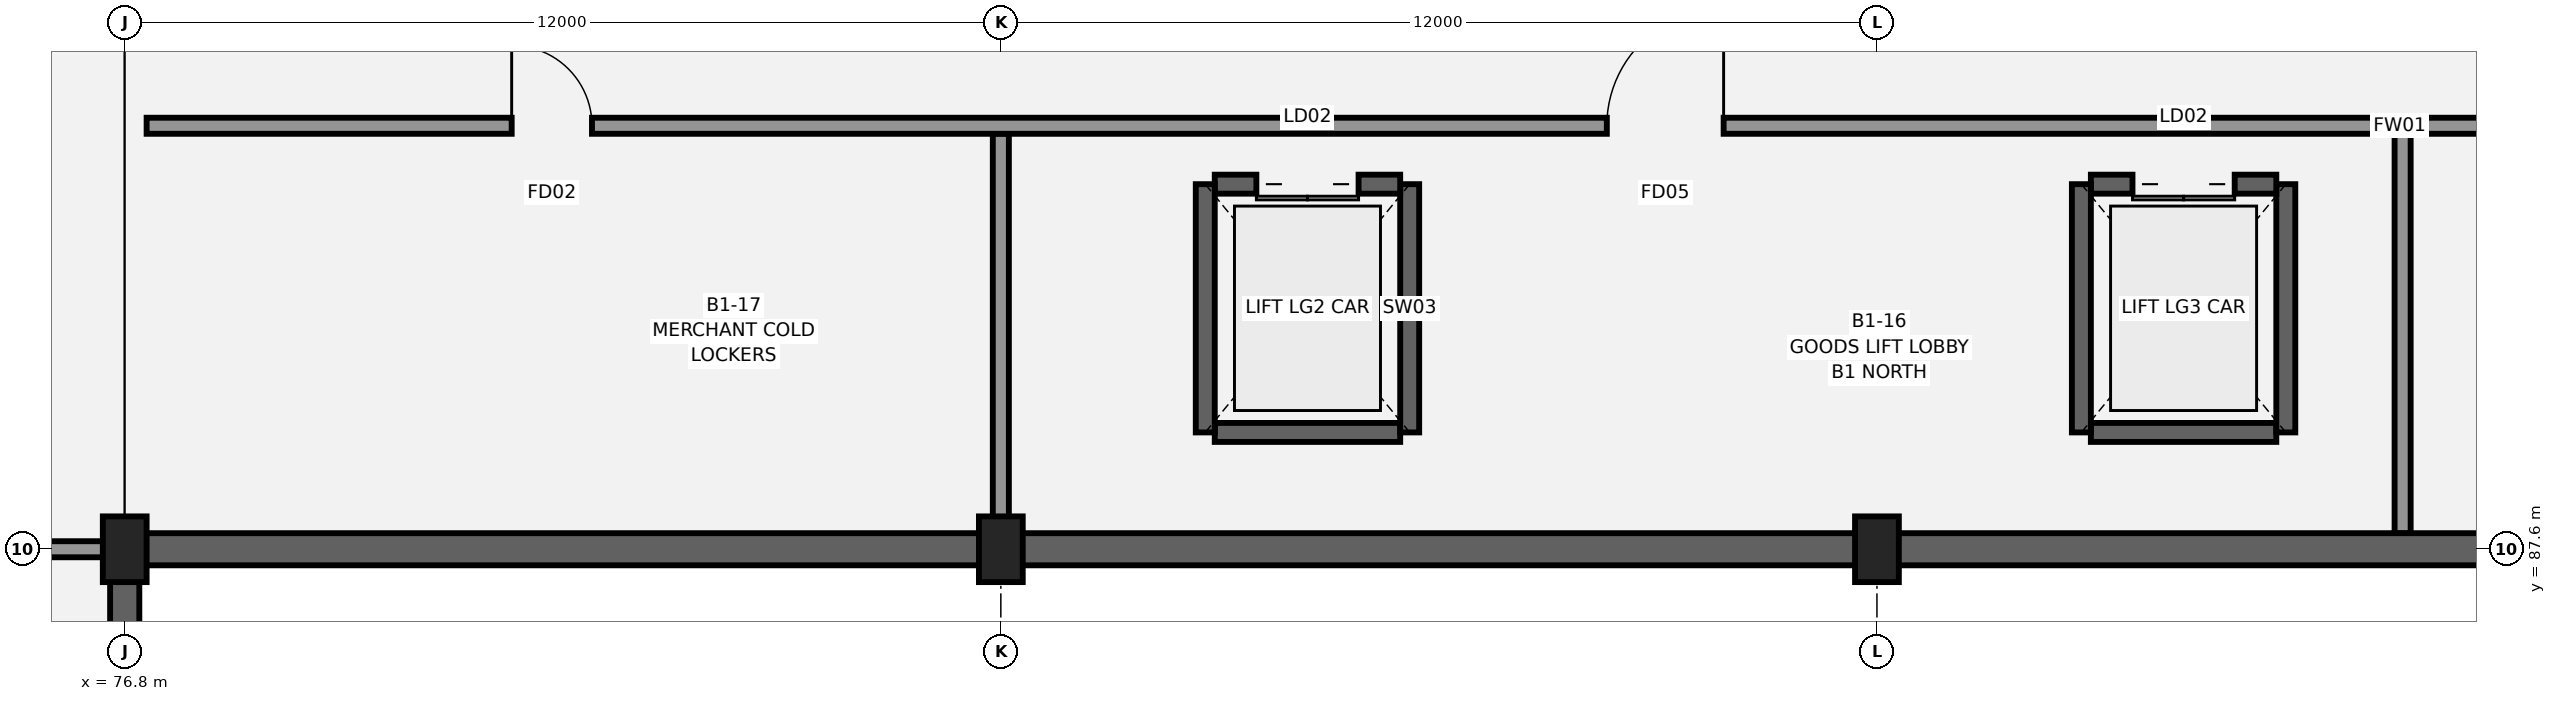
"""IFC4 building model, lengths in metres.
Left out: names, types, materials, properties, quantities, classifications, styles, units other than length and angle.
Written with IfcOpenShell. Run it as: python <this file> out.ifc"""

import sys

from ifc_helpers import new_model, si_unit, direction, frame, frame_2d, origin, origin_2d, place, context, subcontext, project, spatial, rectangle, extrude, element, fill, save


model = new_model("IFC4")
c1 = context("Model", 3, precision=1e-05, world=origin(), true_north=direction((0.0, 1.0)))
c2 = subcontext(c1, "Body", "Model", "MODEL_VIEW")
j1 = project(units=[si_unit("LENGTHUNIT", "METRE"), si_unit("PLANEANGLEUNIT", "RADIAN")], contexts=[c1])
p1 = place(None, origin())
s1 = spatial("IfcSite", under=j1, at=p1, CompositionType="ELEMENT")
p2 = place(p1, origin())
s2 = spatial("IfcBuilding", under=s1, at=p2, CompositionType="ELEMENT")
p3 = place(p2, frame((0.0, 0.0, -4.8)))
s3 = spatial("IfcBuildingStorey", under=s2, at=p3, CompositionType="ELEMENT", Elevation=-4.8)
p4 = place(p3, frame((76.8, 51.6, 0.0), z_axis=(0.0, 0.0, 1.0), x_axis=(0.0, 1.0, 0.0)))
e1 = element("IfcWall", 1, at=p4, inside=s3, PredefinedType="USERDEFINED", context=c2, shape_type="SweptSolid", body=[
    extrude(rectangle(XDim=36.0, YDim=0.4, at=frame_2d((18.0, 0.0))), origin(), (0.0, 0.0, 1.0), 4.46),
])
p5 = place(p3, frame((76.8, 87.6, 0.0), z_axis=(0.0, 0.0, 1.0), x_axis=(1.0, 0.0, 0.0)))
e2 = element("IfcWall", 2, at=p5, inside=s3, PredefinedType="USERDEFINED", context=c2, shape_type="SweptSolid", body=[
    extrude(rectangle(XDim=72.0, YDim=0.44, at=frame_2d((36.0, 0.0))), origin(), (0.0, 0.0, 1.0), 4.46),
])
for number, where, z_axis, x_axis in (
    (3, (76.8, 87.6, 0.0), (0.0, 0.0, 1.0), (1.0, 0.0, 0.0)),
    (4, (88.8, 87.6, 0.0), (0.0, 0.0, 1.0), (1.0, 0.0, 0.0)),
    (5, (100.8, 87.6, 0.0), (0.0, 0.0, 1.0), (1.0, 0.0, 0.0)),
):
    element("IfcColumn", number, at=place(p3, frame(where, z_axis=z_axis, x_axis=x_axis)), inside=s3, PredefinedType="COLUMN", context=c2, shape_type="SweptSolid", body=[
        extrude(rectangle(XDim=0.6, YDim=0.9, at=origin_2d()), origin(), (0.0, 0.0, 1.0), 4.8),
    ])
p6 = place(p3, frame((91.73, 89.2, 0.0), z_axis=(0.0, 0.0, 1.0), x_axis=(1.0, 0.0, 0.0)))
e6 = element("IfcWall", 6, at=p6, inside=s3, PredefinedType="SHEAR", context=c2, shape_type="SweptSolid", body=[
    extrude(rectangle(XDim=2.54, YDim=0.26, at=frame_2d((1.27, 0.0))), origin(), (0.0, 0.0, 1.0), 4.46),
])
p7 = place(p3, frame((94.4, 89.2, 0.0), z_axis=(0.0, 0.0, 1.0), x_axis=(0.0, 1.0, 0.0)))
e7 = element("IfcWall", 7, at=p7, inside=s3, PredefinedType="SHEAR", context=c2, shape_type="SweptSolid", body=[
    extrude(rectangle(XDim=3.4, YDim=0.26, at=frame_2d((1.7, 0.0))), origin(), (0.0, 0.0, 1.0), 4.46),
])
p8 = place(p3, frame((94.27, 92.6, 0.0), z_axis=(0.0, 0.0, 1.0), x_axis=(-1.0, 0.0, 0.0)))
e8 = element("IfcWall", 8, at=p8, inside=s3, PredefinedType="SHEAR", context=c2, shape_type="SweptSolid", body=[
    extrude(rectangle(XDim=2.54, YDim=0.26, at=frame_2d((1.27, 0.0))), origin(), (0.0, 0.0, 1.0), 4.46),
])
p9 = place(p8, frame((0.57, 0.0, 0.0)))
e9 = element("IfcOpeningElement", 9, at=p9, cuts=e8, PredefinedType="OPENING", context=c2, shape_type="SweptSolid", body=[
    extrude(rectangle(XDim=1.4, YDim=2.25, at=frame_2d((0.7, 1.125))), frame((0.0, 0.14, 0.0), z_axis=(0.0, -1.0, 0.0), x_axis=(1.0, 0.0, 0.0)), (0.0, 0.0, 1.0), 0.28),
])
p10 = place(p3, frame((91.6, 92.6, 0.0), z_axis=(0.0, 0.0, 1.0), x_axis=(0.0, -1.0, 0.0)))
e10 = element("IfcWall", 10, at=p10, inside=s3, PredefinedType="SHEAR", context=c2, shape_type="SweptSolid", body=[
    extrude(rectangle(XDim=3.4, YDim=0.26, at=frame_2d((1.7, 0.0))), origin(), (0.0, 0.0, 1.0), 4.46),
])
p11 = place(p3, frame((103.73, 89.2, 0.0), z_axis=(0.0, 0.0, 1.0), x_axis=(1.0, 0.0, 0.0)))
e11 = element("IfcWall", 11, at=p11, inside=s3, PredefinedType="SHEAR", context=c2, shape_type="SweptSolid", body=[
    extrude(rectangle(XDim=2.54, YDim=0.26, at=frame_2d((1.27, 0.0))), origin(), (0.0, 0.0, 1.0), 4.46),
])
p12 = place(p3, frame((106.4, 89.2, 0.0), z_axis=(0.0, 0.0, 1.0), x_axis=(0.0, 1.0, 0.0)))
e12 = element("IfcWall", 12, at=p12, inside=s3, PredefinedType="SHEAR", context=c2, shape_type="SweptSolid", body=[
    extrude(rectangle(XDim=3.4, YDim=0.26, at=frame_2d((1.7, 0.0))), origin(), (0.0, 0.0, 1.0), 4.46),
])
p13 = place(p3, frame((106.27, 92.6, 0.0), z_axis=(0.0, 0.0, 1.0), x_axis=(-1.0, 0.0, 0.0)))
e13 = element("IfcWall", 13, at=p13, inside=s3, PredefinedType="SHEAR", context=c2, shape_type="SweptSolid", body=[
    extrude(rectangle(XDim=2.54, YDim=0.26, at=frame_2d((1.27, 0.0))), origin(), (0.0, 0.0, 1.0), 4.46),
])
p14 = place(p13, frame((0.57, 0.0, 0.0)))
e14 = element("IfcOpeningElement", 14, at=p14, cuts=e13, PredefinedType="OPENING", context=c2, shape_type="SweptSolid", body=[
    extrude(rectangle(XDim=1.4, YDim=2.25, at=frame_2d((0.7, 1.125))), frame((0.0, 0.14, 0.0), z_axis=(0.0, -1.0, 0.0), x_axis=(1.0, 0.0, 0.0)), (0.0, 0.0, 1.0), 0.28),
])
p15 = place(p3, frame((103.6, 92.6, 0.0), z_axis=(0.0, 0.0, 1.0), x_axis=(0.0, -1.0, 0.0)))
e15 = element("IfcWall", 15, at=p15, inside=s3, PredefinedType="SHEAR", context=c2, shape_type="SweptSolid", body=[
    extrude(rectangle(XDim=3.4, YDim=0.26, at=frame_2d((1.7, 0.0))), origin(), (0.0, 0.0, 1.0), 4.46),
])
p16 = place(p3, frame((19.402, 87.6, 0.0), z_axis=(0.0, 0.0, 1.0), x_axis=(1.0, 0.0, 0.0)))
e16 = element("IfcWall", 16, at=p16, inside=s3, PredefinedType="PARTITIONING", context=c2, shape_type="SweptSolid", body=[
    extrude(rectangle(XDim=57.196, YDim=0.22, at=frame_2d((28.598, 0.0))), origin(), (0.0, 0.0, 1.0), 3.905),
])
p17 = place(p16, frame((6.2, 0.0, 0.0)))
e17 = element("IfcOpeningElement", 17, at=p17, cuts=e16, PredefinedType="OPENING", context=c2, shape_type="SweptSolid", body=[
    extrude(rectangle(XDim=1.5, YDim=2.4, at=frame_2d((0.75, 1.2))), frame((0.0, 0.12, 0.0), z_axis=(0.0, -1.0, 0.0), x_axis=(1.0, 0.0, 0.0)), (0.0, 0.0, 1.0), 0.24),
])
p18 = place(p16, frame((25.2, 0.0, 0.0)))
e18 = element("IfcOpeningElement", 18, at=p18, cuts=e16, PredefinedType="OPENING", context=c2, shape_type="SweptSolid", body=[
    extrude(rectangle(XDim=1.5, YDim=2.4, at=frame_2d((0.75, 1.2))), frame((0.0, 0.12, 0.0), z_axis=(0.0, -1.0, 0.0), x_axis=(1.0, 0.0, 0.0)), (0.0, 0.0, 1.0), 0.24),
])
p19 = place(p16, frame((44.2, 0.0, 0.0)))
e19 = element("IfcOpeningElement", 19, at=p19, cuts=e16, PredefinedType="OPENING", context=c2, shape_type="SweptSolid", body=[
    extrude(rectangle(XDim=1.2, YDim=2.2, at=frame_2d((0.6, 1.1))), frame((0.0, 0.12, 0.0), z_axis=(0.0, -1.0, 0.0), x_axis=(1.0, 0.0, 0.0)), (0.0, 0.0, 1.0), 0.24),
])
p20 = place(p3, frame((77.1, 93.4, 0.0), z_axis=(0.0, 0.0, 1.0), x_axis=(1.0, 0.0, 0.0)))
e20 = element("IfcWall", 20, at=p20, inside=s3, PredefinedType="PARTITIONING", context=c2, shape_type="SweptSolid", body=[
    extrude(rectangle(XDim=61.718, YDim=0.22, at=frame_2d((30.859, 0.0))), origin(), (0.0, 0.0, 1.0), 4.44),
])
p21 = place(p20, frame((5.0, 0.0, 0.0)))
e21 = element("IfcOpeningElement", 21, at=p21, cuts=e20, PredefinedType="OPENING", context=c2, shape_type="SweptSolid", body=[
    extrude(rectangle(XDim=1.1, YDim=2.15, at=frame_2d((0.55, 1.075))), frame((0.0, 0.12, 0.0), z_axis=(0.0, -1.0, 0.0), x_axis=(1.0, 0.0, 0.0)), (0.0, 0.0, 1.0), 0.24),
])
p22 = place(p20, frame((20.0, 0.0, 0.0)))
e22 = element("IfcOpeningElement", 22, at=p22, cuts=e20, PredefinedType="OPENING", context=c2, shape_type="SweptSolid", body=[
    extrude(rectangle(XDim=1.6, YDim=2.2, at=frame_2d((0.8, 1.1))), frame((0.0, 0.12, 0.0), z_axis=(0.0, -1.0, 0.0), x_axis=(1.0, 0.0, 0.0)), (0.0, 0.0, 1.0), 0.24),
])
p23 = place(p20, frame((44.0, 0.0, 0.0)))
e23 = element("IfcOpeningElement", 23, at=p23, cuts=e20, PredefinedType="OPENING", context=c2, shape_type="SweptSolid", body=[
    extrude(rectangle(XDim=1.35, YDim=2.2, at=frame_2d((0.675, 1.1))), frame((0.0, 0.12, 0.0), z_axis=(0.0, -1.0, 0.0), x_axis=(1.0, 0.0, 0.0)), (0.0, 0.0, 1.0), 0.24),
])
p24 = place(p3, frame((88.8, 87.822, 0.0), z_axis=(0.0, 0.0, 1.0), x_axis=(0.0, 1.0, 0.0)))
e24 = element("IfcWall", 24, at=p24, inside=s3, PredefinedType="PARTITIONING", context=c2, shape_type="SweptSolid", body=[
    extrude(rectangle(XDim=5.466, YDim=0.22, at=frame_2d((2.733, 0.0))), origin(), (0.0, 0.0, 1.0), 3.915),
])
p25 = place(p3, frame((108.0, 87.822, 0.0), z_axis=(0.0, 0.0, 1.0), x_axis=(0.0, 1.0, 0.0)))
e25 = element("IfcWall", 25, at=p25, inside=s3, PredefinedType="PARTITIONING", context=c2, shape_type="SweptSolid", body=[
    extrude(rectangle(XDim=5.466, YDim=0.22, at=frame_2d((2.733, 0.0))), origin(), (0.0, 0.0, 1.0), 4.44),
])
p26 = place(p21, origin())
e26 = element("IfcDoor", 26, at=p26, inside=s3, OperationType="SINGLE_SWING_LEFT", PredefinedType="DOOR", context=c2, shape_type="SweptSolid", body=[
    extrude(rectangle(XDim=1.1, YDim=2.15, at=frame_2d((0.55, 1.075))), frame((0.0, 0.025, 0.0), z_axis=(0.0, -1.0, 0.0), x_axis=(1.0, 0.0, 0.0)), (0.0, 0.0, 1.0), 0.05),
])
fill(e21, e26)
p27 = place(p22, origin())
e27 = element("IfcDoor", 27, at=p27, inside=s3, OperationType="SINGLE_SWING_RIGHT", PredefinedType="DOOR", context=c2, shape_type="SweptSolid", body=[
    extrude(rectangle(XDim=1.6, YDim=2.2, at=frame_2d((0.8, 1.1))), frame((0.0, 0.025, 0.0), z_axis=(0.0, -1.0, 0.0), x_axis=(1.0, 0.0, 0.0)), (0.0, 0.0, 1.0), 0.05),
])
fill(e22, e27)
p28 = place(p9, origin())
e28 = element("IfcDoor", 28, at=p28, inside=s3, OperationType="DOUBLE_DOOR_SLIDING", PredefinedType="DOOR", context=c2, shape_type="SweptSolid", body=[
    extrude(rectangle(XDim=1.4, YDim=2.25, at=frame_2d((0.7, 1.125))), frame((0.0, 0.025, 0.0), z_axis=(0.0, -1.0, 0.0), x_axis=(1.0, 0.0, 0.0)), (0.0, 0.0, 1.0), 0.05),
])
fill(e9, e28)
p29 = place(p14, origin())
e29 = element("IfcDoor", 29, at=p29, inside=s3, OperationType="DOUBLE_DOOR_SLIDING", PredefinedType="DOOR", context=c2, shape_type="SweptSolid", body=[
    extrude(rectangle(XDim=1.4, YDim=2.25, at=frame_2d((0.7, 1.125))), frame((0.0, 0.025, 0.0), z_axis=(0.0, -1.0, 0.0), x_axis=(1.0, 0.0, 0.0)), (0.0, 0.0, 1.0), 0.05),
])
fill(e14, e29)
save(model, sys.argv[1])
